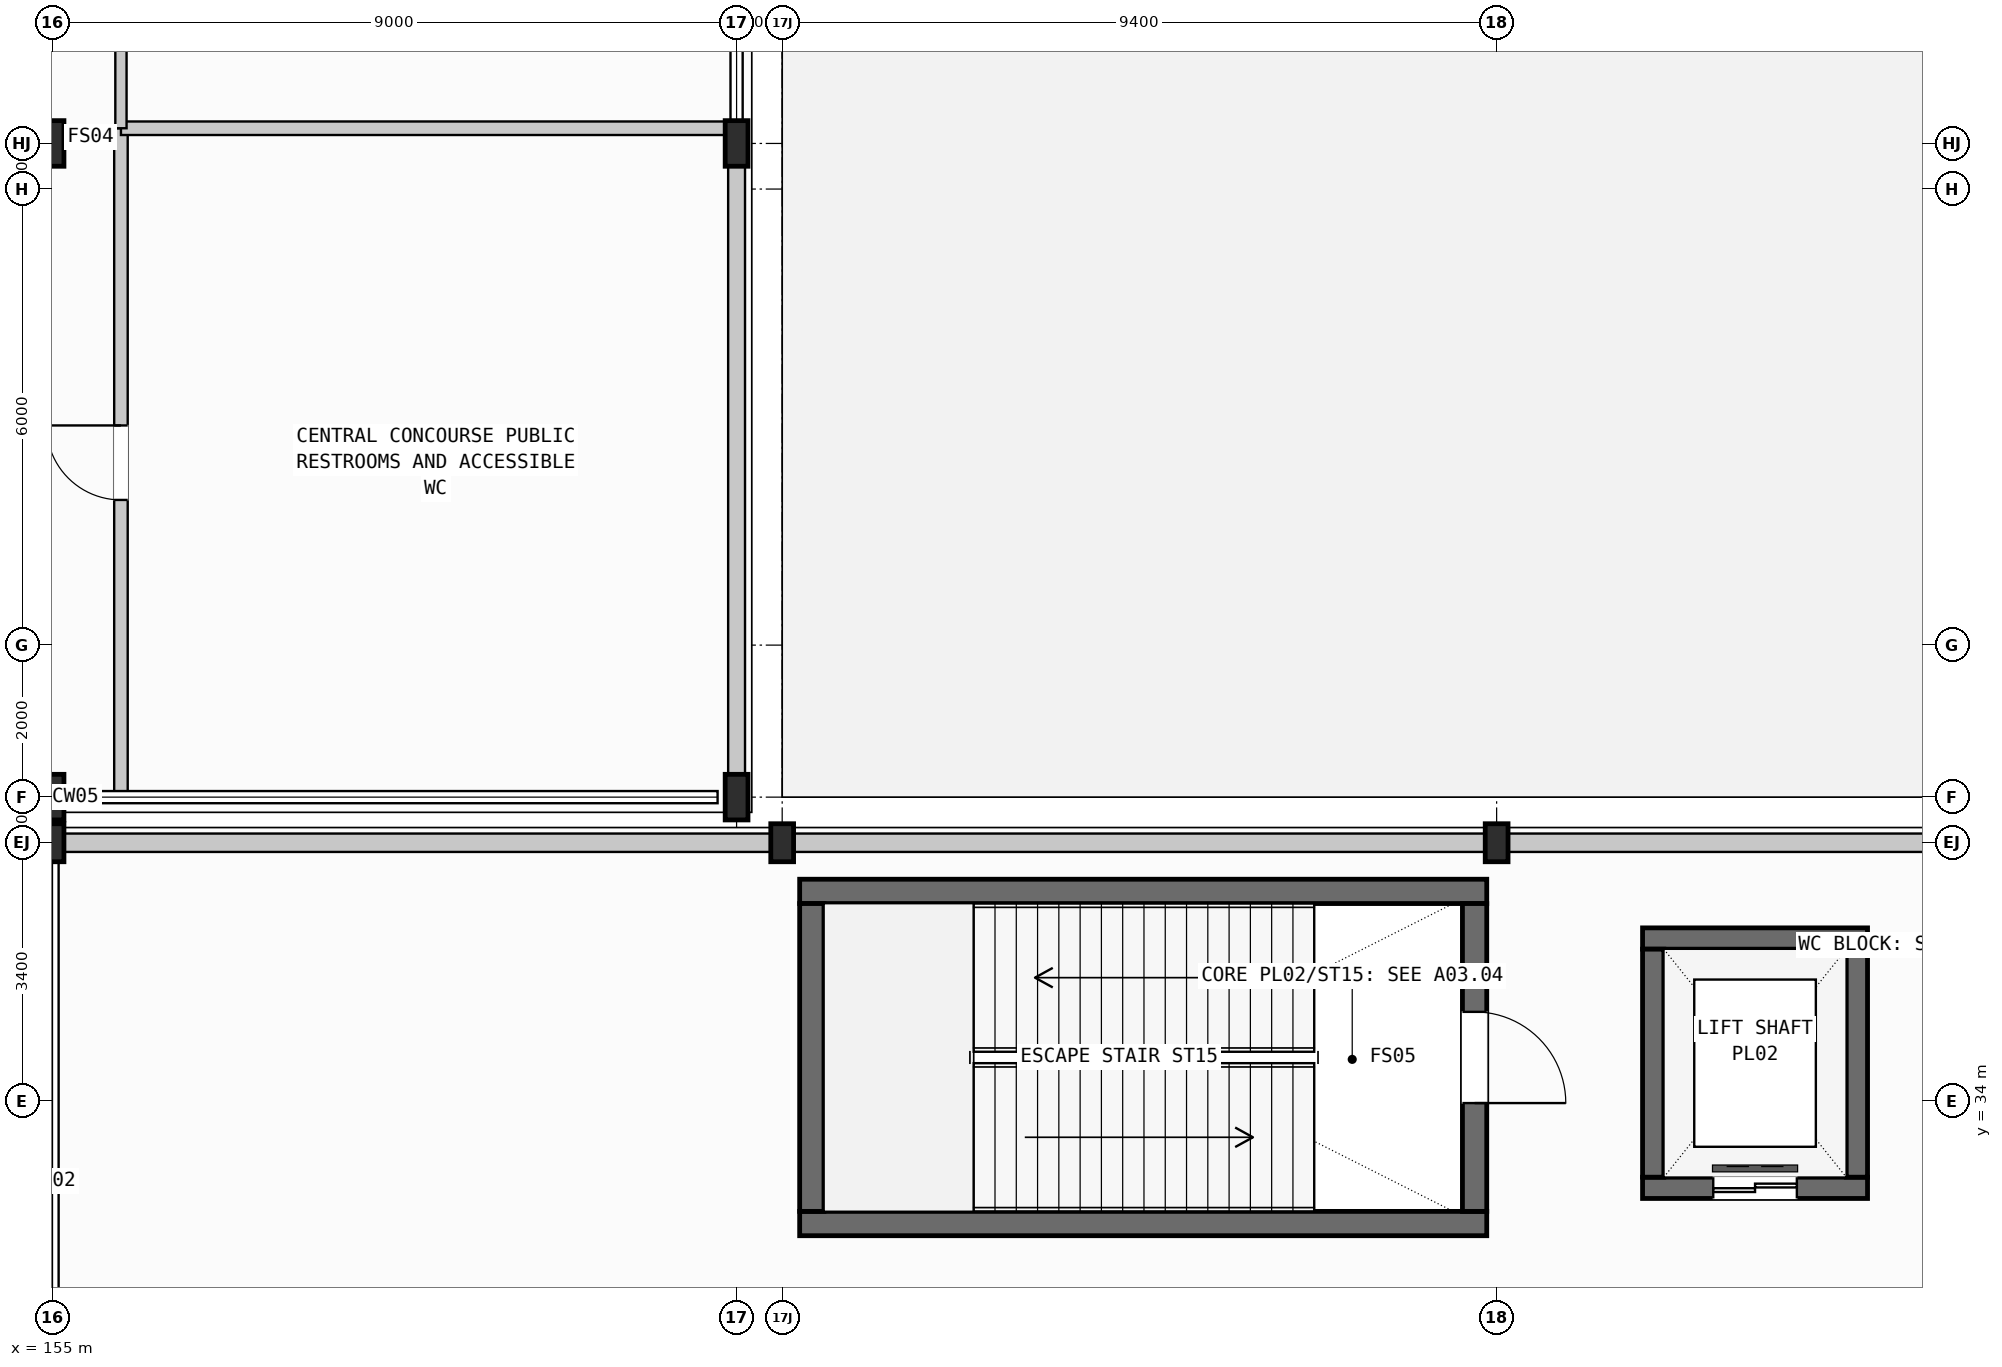
"""IFC4 building model, lengths in metres.
Left out: names, types, materials, properties, quantities, classifications, styles, units other than length and angle.
Written with IfcOpenShell. Run it as: python <this file> out.ifc"""

import sys

from ifc_helpers import new_model, si_unit, direction, frame, frame_2d, origin, origin_2d, place, context, subcontext, project, spatial, rectangle, i_section, extrude, element, fill, save


model = new_model("IFC4")
c1 = context("Model", 3, precision=1e-05, world=origin(), true_north=direction((0.0, 1.0)))
c2 = subcontext(c1, "Body", "Model", "MODEL_VIEW")
j1 = project(units=[si_unit("LENGTHUNIT", "METRE"), si_unit("PLANEANGLEUNIT", "RADIAN")], contexts=[c1])
p1 = place(None, origin())
s1 = spatial("IfcSite", under=j1, at=p1, CompositionType="ELEMENT")
p2 = place(p1, origin())
s2 = spatial("IfcBuilding", under=s1, at=p2, CompositionType="ELEMENT")
p3 = place(p2, origin())
s3 = spatial("IfcBuildingStorey", under=s2, at=p3, CompositionType="ELEMENT", Elevation=0.0)
p4 = place(p3, frame((155.0, 37.4, 0.0), z_axis=(0.0, 0.0, 1.0), x_axis=(1.0, 0.0, 0.0)))
e1 = element("IfcColumn", 1, at=p4, inside=s3, PredefinedType="COLUMN", context=c2, shape_type="SweptSolid", body=[
    extrude(i_section(OverallWidth=0.3, OverallDepth=0.5, WebThickness=0.014, FlangeThickness=0.028, FilletRadius=0.027, at=origin_2d()), origin(), (0.0, 0.0, 1.0), 6.0),
])
for number, where, z_axis, x_axis in (
    (2, (155.0, 38.0, 0.0), (0.0, 0.0, 1.0), (1.0, 0.0, 0.0)),
    (3, (155.0, 46.6, 0.0), (0.0, 0.0, 1.0), (1.0, 0.0, 0.0)),
    (4, (164.0, 38.0, 0.0), (0.0, 0.0, 1.0), (1.0, 0.0, 0.0)),
    (5, (164.0, 46.6, 0.0), (0.0, 0.0, 1.0), (1.0, 0.0, 0.0)),
):
    element("IfcColumn", number, at=place(p3, frame(where, z_axis=z_axis, x_axis=x_axis)), inside=s3, PredefinedType="COLUMN", context=c2, shape_type="SweptSolid", body=[
        extrude(i_section(OverallWidth=0.3, OverallDepth=0.6, WebThickness=0.015, FlangeThickness=0.03, FilletRadius=0.027, at=origin_2d()), origin(), (0.0, 0.0, 1.0), 6.0),
    ])
for number, where, z_axis, x_axis in (
    (6, (164.6, 37.4, 0.0), (0.0, 0.0, 1.0), (1.0, 0.0, 0.0)),
    (7, (174.0, 37.4, 0.0), (0.0, 0.0, 1.0), (1.0, 0.0, 0.0)),
):
    element("IfcColumn", number, at=place(p3, frame(where, z_axis=z_axis, x_axis=x_axis)), inside=s3, PredefinedType="COLUMN", context=c2, shape_type="SweptSolid", body=[
        extrude(i_section(OverallWidth=0.3, OverallDepth=0.5, WebThickness=0.014, FlangeThickness=0.028, FilletRadius=0.027, at=origin_2d()), origin(), (0.0, 0.0, 1.0), 6.0),
    ])
for number, where, z_axis, x_axis in (
    (8, (164.83, 32.39, 0.0), (0.0, 0.0, 1.0), (1.0, 0.0, 0.0)),
    (9, (164.83, 36.76, 0.0), (0.0, 0.0, 1.0), (1.0, 0.0, 0.0)),
):
    element("IfcWall", number, at=place(p3, frame(where, z_axis=z_axis, x_axis=x_axis)), inside=s3, PredefinedType="SHEAR", context=c2, shape_type="SweptSolid", body=[
        extrude(rectangle(XDim=9.04, YDim=0.32, at=frame_2d((4.52, 0.0))), origin(), (0.0, 0.0, 1.0), 6.0),
    ])
p5 = place(p3, frame((164.99, 32.55, 0.0), z_axis=(0.0, 0.0, 1.0), x_axis=(0.0, 1.0, 0.0)))
e10 = element("IfcWall", 10, at=p5, inside=s3, PredefinedType="SHEAR", context=c2, shape_type="SweptSolid", body=[
    extrude(rectangle(XDim=4.05, YDim=0.32, at=frame_2d((2.025, 0.0))), origin(), (0.0, 0.0, 1.0), 6.0),
])
p6 = place(p3, frame((173.71, 32.55, 0.0), z_axis=(0.0, 0.0, 1.0), x_axis=(0.0, 1.0, 0.0)))
e11 = element("IfcWall", 11, at=p6, inside=s3, PredefinedType="SHEAR", context=c2, shape_type="SweptSolid", body=[
    extrude(rectangle(XDim=4.05, YDim=0.32, at=frame_2d((2.025, 0.0))), origin(), (0.0, 0.0, 1.0), 6.0),
])
p7 = place(p6, frame((1.425, 0.0, 0.0)))
e12 = element("IfcOpeningElement", 12, at=p7, cuts=e11, PredefinedType="OPENING", context=c2, shape_type="SweptSolid", body=[
    extrude(rectangle(XDim=1.2, YDim=2.2, at=frame_2d((0.6, 1.1))), frame((0.0, 0.17, 0.0), z_axis=(0.0, -1.0, 0.0), x_axis=(1.0, 0.0, 0.0)), (0.0, 0.0, 1.0), 0.34),
])
p8 = place(p3, frame((175.92, 32.86, 0.0), z_axis=(0.0, 0.0, 1.0), x_axis=(1.0, 0.0, 0.0)))
e13 = element("IfcWall", 13, at=p8, inside=s3, PredefinedType="SHEAR", context=c2, shape_type="SweptSolid", body=[
    extrude(rectangle(XDim=2.96, YDim=0.28, at=frame_2d((1.48, 0.0))), origin(), (0.0, 0.0, 1.0), 6.0),
])
p9 = place(p8, frame((0.93, 0.0, 0.0)))
e14 = element("IfcOpeningElement", 14, at=p9, cuts=e13, PredefinedType="OPENING", context=c2, shape_type="SweptSolid", body=[
    extrude(rectangle(XDim=1.1, YDim=2.15, at=frame_2d((0.55, 1.075))), frame((0.0, 0.15, 0.0), z_axis=(0.0, -1.0, 0.0), x_axis=(1.0, 0.0, 0.0)), (0.0, 0.0, 1.0), 0.3),
])
p10 = place(p3, frame((175.92, 36.14, 0.0), z_axis=(0.0, 0.0, 1.0), x_axis=(1.0, 0.0, 0.0)))
e15 = element("IfcWall", 15, at=p10, inside=s3, PredefinedType="SHEAR", context=c2, shape_type="SweptSolid", body=[
    extrude(rectangle(XDim=2.96, YDim=0.28, at=frame_2d((1.48, 0.0))), origin(), (0.0, 0.0, 1.0), 6.0),
])
for number, where, z_axis, x_axis in (
    (16, (176.06, 33.0, 0.0), (0.0, 0.0, 1.0), (0.0, 1.0, 0.0)),
    (17, (178.74, 33.0, 0.0), (0.0, 0.0, 1.0), (0.0, 1.0, 0.0)),
):
    element("IfcWall", number, at=place(p3, frame(where, z_axis=z_axis, x_axis=x_axis)), inside=s3, PredefinedType="SHEAR", context=c2, shape_type="SweptSolid", body=[
        extrude(rectangle(XDim=3.0, YDim=0.28, at=frame_2d((1.5, 0.0))), origin(), (0.0, 0.0, 1.0), 6.0),
    ])
p11 = place(p3, frame((164.0, 38.296, 0.0), z_axis=(0.0, 0.0, 1.0), x_axis=(0.0, 1.0, 0.0)))
e18 = element("IfcWall", 18, at=p11, inside=s3, PredefinedType="STANDARD", context=c2, shape_type="SweptSolid", body=[
    extrude(rectangle(XDim=8.008, YDim=0.222, at=frame_2d((4.004, 0.0))), origin(), (0.0, 0.0, 1.0), 5.098),
])
p12 = place(p3, frame((155.146, 37.4, 0.0), z_axis=(0.0, 0.0, 1.0), x_axis=(1.0, 0.0, 0.0)))
e19 = element("IfcWall", 19, at=p12, inside=s3, PredefinedType="STANDARD", context=c2, shape_type="SweptSolid", body=[
    extrude(rectangle(XDim=9.308, YDim=0.242, at=frame_2d((4.654, 0.0))), origin(), (0.0, 0.0, 1.0), 5.1),
])
p13 = place(p3, frame((164.746, 37.4, 0.0), z_axis=(0.0, 0.0, 1.0), x_axis=(1.0, 0.0, 0.0)))
e20 = element("IfcWall", 20, at=p13, inside=s3, PredefinedType="STANDARD", context=c2, shape_type="SweptSolid", body=[
    extrude(rectangle(XDim=9.108, YDim=0.242, at=frame_2d((4.554, 0.0))), origin(), (0.0, 0.0, 1.0), 5.1),
])
p14 = place(p3, frame((174.146, 37.4, 0.0), z_axis=(0.0, 0.0, 1.0), x_axis=(1.0, 0.0, 0.0)))
e21 = element("IfcWall", 21, at=p14, inside=s3, PredefinedType="STANDARD", context=c2, shape_type="SweptSolid", body=[
    extrude(rectangle(XDim=9.708, YDim=0.242, at=frame_2d((4.854, 0.0))), origin(), (0.0, 0.0, 1.0), 5.1),
])
p15 = place(p3, frame((155.9, 38.0, 0.0), z_axis=(0.0, 0.0, 1.0), x_axis=(0.0, 1.0, 0.0)))
e22 = element("IfcWall", 22, at=p15, inside=s3, PredefinedType="PARTITIONING", context=c2, shape_type="SweptSolid", body=[
    extrude(rectangle(XDim=8.8, YDim=0.178, at=frame_2d((4.4, 0.0))), origin(), (0.0, 0.0, 1.0), 4.9),
])
p16 = place(p15, frame((3.91, 0.0, 0.0)))
e23 = element("IfcOpeningElement", 23, at=p16, cuts=e22, PredefinedType="OPENING", context=c2, shape_type="SweptSolid", body=[
    extrude(rectangle(XDim=0.98, YDim=2.14, at=frame_2d((0.49, 1.07))), frame((0.0, 0.099, 0.0), z_axis=(0.0, -1.0, 0.0), x_axis=(1.0, 0.0, 0.0)), (0.0, 0.0, 1.0), 0.198),
])
p17 = place(p3, frame((155.9, 46.8, 0.0), z_axis=(0.0, 0.0, 1.0), x_axis=(1.0, 0.0, 0.0)))
e24 = element("IfcWall", 24, at=p17, inside=s3, PredefinedType="PARTITIONING", context=c2, shape_type="SweptSolid", body=[
    extrude(rectangle(XDim=8.1, YDim=0.178, at=frame_2d((4.05, 0.0))), origin(), (0.0, 0.0, 1.0), 4.9),
])
p18 = place(p3, frame((155.9, 46.8, 0.0), z_axis=(0.0, 0.0, 1.0), x_axis=(0.0, 1.0, 0.0)))
e25 = element("IfcWall", 25, at=p18, inside=s3, PredefinedType="PARTITIONING", context=c2, shape_type="SweptSolid", body=[
    extrude(rectangle(XDim=27.2, YDim=0.148, at=frame_2d((13.6, 0.0))), origin(), (0.0, 0.0, 1.0), 4.9),
])
p19 = place(p18, frame((11.6, 0.0, 0.0)))
e26 = element("IfcOpeningElement", 26, at=p19, cuts=e25, PredefinedType="OPENING", context=c2, shape_type="SweptSolid", body=[
    extrude(rectangle(XDim=2.5, YDim=2.42, at=frame_2d((1.25, 1.21))), frame((0.0, 0.084, 0.0), z_axis=(0.0, -1.0, 0.0), x_axis=(1.0, 0.0, 0.0)), (0.0, 0.0, 1.0), 0.168),
])
p20 = place(p7, frame((1.2, 0.0, 0.0), z_axis=(0.0, 0.0, 1.0), x_axis=(-1.0, 0.0, 0.0)))
e27 = element("IfcDoor", 27, at=p20, inside=s3, OperationType="SINGLE_SWING_RIGHT", PredefinedType="DOOR", context=c2, shape_type="SweptSolid", body=[
    extrude(rectangle(XDim=1.2, YDim=2.2, at=frame_2d((0.6, 1.1))), frame((0.0, 0.025, 0.0), z_axis=(0.0, -1.0, 0.0), x_axis=(1.0, 0.0, 0.0)), (0.0, 0.0, 1.0), 0.05),
])
fill(e12, e27)
p21 = place(p9, origin())
e28 = element("IfcDoor", 28, at=p21, inside=s3, OperationType="DOUBLE_DOOR_SLIDING", PredefinedType="DOOR", context=c2, shape_type="SweptSolid", body=[
    extrude(rectangle(XDim=1.1, YDim=2.15, at=frame_2d((0.55, 1.075))), frame((0.0, 0.025, 0.0), z_axis=(0.0, -1.0, 0.0), x_axis=(1.0, 0.0, 0.0)), (0.0, 0.0, 1.0), 0.05),
])
fill(e14, e28)
p22 = place(p16, origin())
e29 = element("IfcDoor", 29, at=p22, inside=s3, OperationType="SINGLE_SWING_RIGHT", PredefinedType="DOOR", context=c2, shape_type="SweptSolid", body=[
    extrude(rectangle(XDim=0.98, YDim=2.14, at=frame_2d((0.49, 1.07))), frame((0.0, 0.025, 0.0), z_axis=(0.0, -1.0, 0.0), x_axis=(1.0, 0.0, 0.0)), (0.0, 0.0, 1.0), 0.05),
])
fill(e23, e29)
save(model, sys.argv[1])
